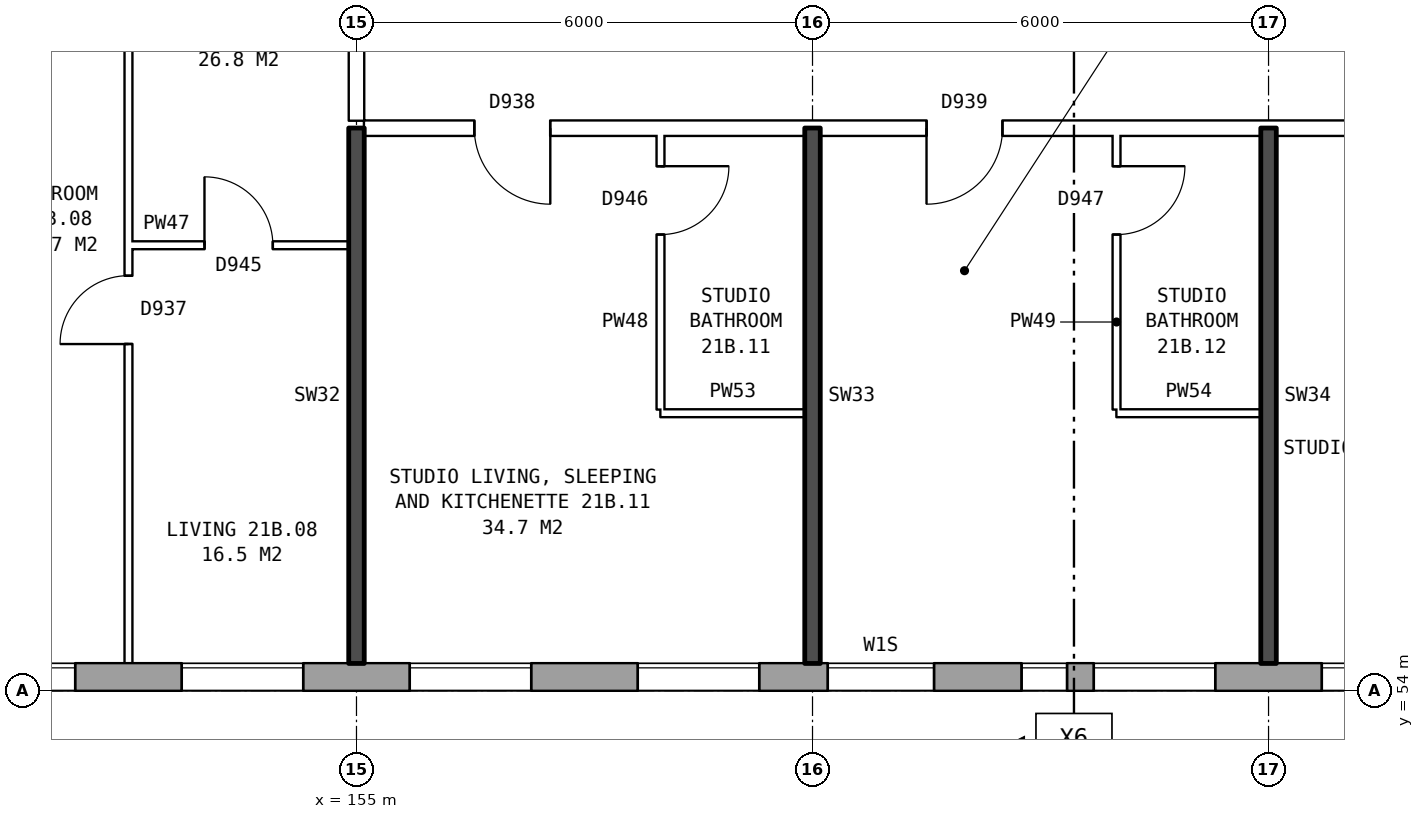
"""IFC4 building model, lengths in metres.
Left out: names, types, materials, properties, quantities, classifications, styles, units other than length and angle.
Written with IfcOpenShell. Run it as: python <this file> out.ifc"""

import sys

from ifc_helpers import new_model, si_unit, direction, frame, frame_2d, origin, place, context, subcontext, project, spatial, rectangle, extrude, element, fill, save


model = new_model("IFC4")
c1 = context("Model", 3, precision=1e-05, world=origin(), true_north=direction((0.0, 1.0)))
c2 = subcontext(c1, "Body", "Model", "MODEL_VIEW")
j1 = project(units=[si_unit("LENGTHUNIT", "METRE"), si_unit("PLANEANGLEUNIT", "RADIAN")], contexts=[c1])
p1 = place(None, origin())
s1 = spatial("IfcSite", under=j1, at=p1, CompositionType="ELEMENT")
p2 = place(p1, origin())
s2 = spatial("IfcBuilding", under=s1, at=p2, CompositionType="ELEMENT")
p3 = place(p2, frame((0.0, 0.0, 77.8)))
s3 = spatial("IfcBuildingStorey", under=s2, at=p3, CompositionType="ELEMENT", Elevation=77.8)
p4 = place(p3, frame((134.075, 54.18, 0.0), z_axis=(0.0, 0.0, 1.0), x_axis=(1.0, 0.0, 0.0)))
e1 = element("IfcWall", 1, at=p4, inside=s3, PredefinedType="STANDARD", context=c2, shape_type="SweptSolid", body=[
    extrude(rectangle(XDim=38.101, YDim=0.36, at=frame_2d((19.05, 0.0))), origin(), (0.0, 0.0, 1.0), 2.85),
])
p5 = place(p4, frame((0.625, 0.0, 0.8)))
e2 = element("IfcOpeningElement", 2, at=p5, cuts=e1, PredefinedType="OPENING", context=c2, shape_type="SweptSolid", body=[
    extrude(rectangle(XDim=1.6, YDim=1.8, at=frame_2d((0.8, 0.9))), frame((0.0, 0.19, 0.0), z_axis=(0.0, -1.0, 0.0), x_axis=(1.0, 0.0, 0.0)), (0.0, 0.0, 1.0), 0.38),
])
p6 = place(p4, frame((3.625, 0.0, 0.8)))
e3 = element("IfcOpeningElement", 3, at=p6, cuts=e1, PredefinedType="OPENING", context=c2, shape_type="SweptSolid", body=[
    extrude(rectangle(XDim=1.6, YDim=1.8, at=frame_2d((0.8, 0.9))), frame((0.0, 0.19, 0.0), z_axis=(0.0, -1.0, 0.0), x_axis=(1.0, 0.0, 0.0)), (0.0, 0.0, 1.0), 0.38),
])
p7 = place(p4, frame((5.525, 0.0, 0.8)))
e4 = element("IfcOpeningElement", 4, at=p7, cuts=e1, PredefinedType="OPENING", context=c2, shape_type="SweptSolid", body=[
    extrude(rectangle(XDim=1.6, YDim=1.8, at=frame_2d((0.8, 0.9))), frame((0.0, 0.19, 0.0), z_axis=(0.0, -1.0, 0.0), x_axis=(1.0, 0.0, 0.0)), (0.0, 0.0, 1.0), 0.38),
])
p8 = place(p4, frame((9.425, 0.0, 0.65)))
e5 = element("IfcOpeningElement", 5, at=p8, cuts=e1, PredefinedType="OPENING", context=c2, shape_type="SweptSolid", body=[
    extrude(rectangle(XDim=0.6, YDim=0.9, at=frame_2d((0.3, 0.45))), frame((0.0, 0.19, 0.0), z_axis=(0.0, -1.0, 0.0), x_axis=(1.0, 0.0, 0.0)), (0.0, 0.0, 1.0), 0.38),
])
p9 = place(p4, frame((12.625, 0.0, 0.8)))
e6 = element("IfcOpeningElement", 6, at=p9, cuts=e1, PredefinedType="OPENING", context=c2, shape_type="SweptSolid", body=[
    extrude(rectangle(XDim=1.6, YDim=1.8, at=frame_2d((0.8, 0.9))), frame((0.0, 0.19, 0.0), z_axis=(0.0, -1.0, 0.0), x_axis=(1.0, 0.0, 0.0)), (0.0, 0.0, 1.0), 0.38),
])
p10 = place(p4, frame((15.625, 0.0, 0.8)))
e7 = element("IfcOpeningElement", 7, at=p10, cuts=e1, PredefinedType="OPENING", context=c2, shape_type="SweptSolid", body=[
    extrude(rectangle(XDim=1.6, YDim=1.8, at=frame_2d((0.8, 0.9))), frame((0.0, 0.19, 0.0), z_axis=(0.0, -1.0, 0.0), x_axis=(1.0, 0.0, 0.0)), (0.0, 0.0, 1.0), 0.38),
])
p11 = place(p4, frame((18.625, 0.0, 0.8)))
e8 = element("IfcOpeningElement", 8, at=p11, cuts=e1, PredefinedType="OPENING", context=c2, shape_type="SweptSolid", body=[
    extrude(rectangle(XDim=1.6, YDim=1.8, at=frame_2d((0.8, 0.9))), frame((0.0, 0.19, 0.0), z_axis=(0.0, -1.0, 0.0), x_axis=(1.0, 0.0, 0.0)), (0.0, 0.0, 1.0), 0.38),
])
p12 = place(p4, frame((21.625, 0.0, 0.8)))
e9 = element("IfcOpeningElement", 9, at=p12, cuts=e1, PredefinedType="OPENING", context=c2, shape_type="SweptSolid", body=[
    extrude(rectangle(XDim=1.6, YDim=1.8, at=frame_2d((0.8, 0.9))), frame((0.0, 0.19, 0.0), z_axis=(0.0, -1.0, 0.0), x_axis=(1.0, 0.0, 0.0)), (0.0, 0.0, 1.0), 0.38),
])
p13 = place(p4, frame((24.625, 0.0, 0.8)))
e10 = element("IfcOpeningElement", 10, at=p13, cuts=e1, PredefinedType="OPENING", context=c2, shape_type="SweptSolid", body=[
    extrude(rectangle(XDim=1.6, YDim=1.8, at=frame_2d((0.8, 0.9))), frame((0.0, 0.19, 0.0), z_axis=(0.0, -1.0, 0.0), x_axis=(1.0, 0.0, 0.0)), (0.0, 0.0, 1.0), 0.38),
])
p14 = place(p4, frame((27.125, 0.0, 0.8)))
e11 = element("IfcOpeningElement", 11, at=p14, cuts=e1, PredefinedType="OPENING", context=c2, shape_type="SweptSolid", body=[
    extrude(rectangle(XDim=1.4, YDim=0.9, at=frame_2d((0.7, 0.45))), frame((0.0, 0.19, 0.0), z_axis=(0.0, -1.0, 0.0), x_axis=(1.0, 0.0, 0.0)), (0.0, 0.0, 1.0), 0.38),
])
p15 = place(p4, frame((30.625, 0.0, 0.8)))
e12 = element("IfcOpeningElement", 12, at=p15, cuts=e1, PredefinedType="OPENING", context=c2, shape_type="SweptSolid", body=[
    extrude(rectangle(XDim=1.6, YDim=1.8, at=frame_2d((0.8, 0.9))), frame((0.0, 0.19, 0.0), z_axis=(0.0, -1.0, 0.0), x_axis=(1.0, 0.0, 0.0)), (0.0, 0.0, 1.0), 0.38),
])
p16 = place(p4, frame((33.625, 0.0, 0.8)))
e13 = element("IfcOpeningElement", 13, at=p16, cuts=e1, PredefinedType="OPENING", context=c2, shape_type="SweptSolid", body=[
    extrude(rectangle(XDim=1.6, YDim=1.8, at=frame_2d((0.8, 0.9))), frame((0.0, 0.19, 0.0), z_axis=(0.0, -1.0, 0.0), x_axis=(1.0, 0.0, 0.0)), (0.0, 0.0, 1.0), 0.38),
])
p17 = place(p4, frame((7.425, 0.0, 1.3)))
e14 = element("IfcOpeningElement", 14, at=p17, cuts=e1, PredefinedType="OPENING", context=c2, shape_type="SweptSolid", body=[
    extrude(rectangle(XDim=0.6, YDim=1.2, at=frame_2d((0.3, 0.6))), frame((0.0, 0.19, 0.0), z_axis=(0.0, -1.0, 0.0), x_axis=(1.0, 0.0, 0.0)), (0.0, 0.0, 1.0), 0.38),
])
p18 = place(p4, frame((10.325, 0.0, 0.65)))
e15 = element("IfcOpeningElement", 15, at=p18, cuts=e1, PredefinedType="OPENING", context=c2, shape_type="SweptSolid", body=[
    extrude(rectangle(XDim=1.4, YDim=1.8, at=frame_2d((0.7, 0.9))), frame((0.0, 0.19, 0.0), z_axis=(0.0, -1.0, 0.0), x_axis=(1.0, 0.0, 0.0)), (0.0, 0.0, 1.0), 0.38),
])
p19 = place(p4, frame((29.675, 0.0, 1.7)))
e16 = element("IfcOpeningElement", 16, at=p19, cuts=e1, PredefinedType="OPENING", context=c2, shape_type="SweptSolid", body=[
    extrude(rectangle(XDim=0.6, YDim=0.9, at=frame_2d((0.3, 0.45))), frame((0.0, 0.19, 0.0), z_axis=(0.0, -1.0, 0.0), x_axis=(1.0, 0.0, 0.0)), (0.0, 0.0, 1.0), 0.38),
])
for number, where, z_axis, x_axis in (
    (17, (159.0, 57.65, 0.0), (0.0, 0.0, 1.0), (1.0, 0.0, 0.0)),
    (18, (165.0, 57.65, 0.0), (0.0, 0.0, 1.0), (1.0, 0.0, 0.0)),
):
    element("IfcWall", number, at=place(p3, frame(where, z_axis=z_axis, x_axis=x_axis)), inside=s3, PredefinedType="PARTITIONING", context=c2, shape_type="SweptSolid", body=[
        extrude(rectangle(XDim=1.9, YDim=0.1, at=frame_2d((0.95, 0.0))), origin(), (0.0, 0.0, 1.0), 2.85),
    ])
p20 = place(p3, frame((152.0, 59.86, 0.0), z_axis=(0.0, 0.0, 1.0), x_axis=(1.0, 0.0, 0.0)))
e19 = element("IfcWall", 19, at=p20, inside=s3, PredefinedType="PARTITIONING", context=c2, shape_type="SweptSolid", body=[
    extrude(rectangle(XDim=2.9, YDim=0.1, at=frame_2d((1.45, 0.0))), origin(), (0.0, 0.0, 1.0), 2.85),
])
p21 = place(p20, frame((1.0, 0.0, 0.0)))
e20 = element("IfcOpeningElement", 20, at=p21, cuts=e19, PredefinedType="OPENING", context=c2, shape_type="SweptSolid", body=[
    extrude(rectangle(XDim=0.9, YDim=2.1, at=frame_2d((0.45, 1.05))), frame((0.0, 0.06, 0.0), z_axis=(0.0, -1.0, 0.0), x_axis=(1.0, 0.0, 0.0)), (0.0, 0.0, 1.0), 0.12),
])
p22 = place(p3, frame((155.1, 61.4, 0.0), z_axis=(0.0, 0.0, 1.0), x_axis=(1.0, 0.0, 0.0)))
e21 = element("IfcWall", 21, at=p22, inside=s3, PredefinedType="PARTITIONING", context=c2, shape_type="SweptSolid", body=[
    extrude(rectangle(XDim=19.79, YDim=0.2, at=frame_2d((9.895, 0.0))), origin(), (0.0, 0.0, 1.0), 2.85),
])
p23 = place(p22, frame((1.45, 0.0, 0.0)))
e22 = element("IfcOpeningElement", 22, at=p23, cuts=e21, PredefinedType="OPENING", context=c2, shape_type="SweptSolid", body=[
    extrude(rectangle(XDim=1.0, YDim=2.1, at=frame_2d((0.5, 1.05))), frame((0.0, 0.11, 0.0), z_axis=(0.0, -1.0, 0.0), x_axis=(1.0, 0.0, 0.0)), (0.0, 0.0, 1.0), 0.22),
])
p24 = place(p22, frame((7.4, 0.0, 0.0)))
e23 = element("IfcOpeningElement", 23, at=p24, cuts=e21, PredefinedType="OPENING", context=c2, shape_type="SweptSolid", body=[
    extrude(rectangle(XDim=1.0, YDim=2.1, at=frame_2d((0.5, 1.05))), frame((0.0, 0.11, 0.0), z_axis=(0.0, -1.0, 0.0), x_axis=(1.0, 0.0, 0.0)), (0.0, 0.0, 1.0), 0.22),
])
p25 = place(p22, frame((13.2, 0.0, 0.0)))
e24 = element("IfcOpeningElement", 24, at=p25, cuts=e21, PredefinedType="OPENING", context=c2, shape_type="SweptSolid", body=[
    extrude(rectangle(XDim=1.0, YDim=2.1, at=frame_2d((0.5, 1.05))), frame((0.0, 0.11, 0.0), z_axis=(0.0, -1.0, 0.0), x_axis=(1.0, 0.0, 0.0)), (0.0, 0.0, 1.0), 0.22),
])
p26 = place(p3, frame((152.0, 54.36, 0.0), z_axis=(0.0, 0.0, 1.0), x_axis=(0.0, 1.0, 0.0)))
e25 = element("IfcWall", 25, at=p26, inside=s3, PredefinedType="PARTITIONING", context=c2, shape_type="SweptSolid", body=[
    extrude(rectangle(XDim=14.34, YDim=0.1, at=frame_2d((7.17, 0.0))), origin(), (0.0, 0.0, 1.0), 2.85),
])
p27 = place(p26, frame((4.2, 0.0, 0.0)))
e26 = element("IfcOpeningElement", 26, at=p27, cuts=e25, PredefinedType="OPENING", context=c2, shape_type="SweptSolid", body=[
    extrude(rectangle(XDim=0.9, YDim=2.1, at=frame_2d((0.45, 1.05))), frame((0.0, 0.06, 0.0), z_axis=(0.0, -1.0, 0.0), x_axis=(1.0, 0.0, 0.0)), (0.0, 0.0, 1.0), 0.12),
])
p28 = place(p26, frame((13.04, 0.0, 0.0)))
e27 = element("IfcOpeningElement", 27, at=p28, cuts=e25, PredefinedType="OPENING", context=c2, shape_type="SweptSolid", body=[
    extrude(rectangle(XDim=0.9, YDim=2.1, at=frame_2d((0.45, 1.05))), frame((0.0, 0.06, 0.0), z_axis=(0.0, -1.0, 0.0), x_axis=(1.0, 0.0, 0.0)), (0.0, 0.0, 1.0), 0.12),
])
p29 = place(p3, frame((155.0, 54.36, 0.0), z_axis=(0.0, 0.0, 1.0), x_axis=(0.0, 1.0, 0.0)))
e28 = element("IfcWall", 28, at=p29, inside=s3, PredefinedType="SOLIDWALL", context=c2, shape_type="SweptSolid", body=[
    extrude(rectangle(XDim=7.04, YDim=0.2, at=frame_2d((3.52, 0.0))), origin(), (0.0, 0.0, 1.0), 2.85),
])
p30 = place(p3, frame((155.0, 61.5, 0.0), z_axis=(0.0, 0.0, 1.0), x_axis=(0.0, 1.0, 0.0)))
e29 = element("IfcWall", 29, at=p30, inside=s3, PredefinedType="PARTITIONING", context=c2, shape_type="SweptSolid", body=[
    extrude(rectangle(XDim=2.2, YDim=0.2, at=frame_2d((1.1, 0.0))), origin(), (0.0, 0.0, 1.0), 2.85),
])
p31 = place(p3, frame((159.0, 57.7, 0.0), z_axis=(0.0, 0.0, 1.0), x_axis=(0.0, 1.0, 0.0)))
e30 = element("IfcWall", 30, at=p31, inside=s3, PredefinedType="PARTITIONING", context=c2, shape_type="SweptSolid", body=[
    extrude(rectangle(XDim=3.6, YDim=0.1, at=frame_2d((1.8, 0.0))), origin(), (0.0, 0.0, 1.0), 2.85),
])
p32 = place(p31, frame((2.3, 0.0, 0.0)))
e31 = element("IfcOpeningElement", 31, at=p32, cuts=e30, PredefinedType="OPENING", context=c2, shape_type="SweptSolid", body=[
    extrude(rectangle(XDim=0.9, YDim=2.1, at=frame_2d((0.45, 1.05))), frame((0.0, 0.06, 0.0), z_axis=(0.0, -1.0, 0.0), x_axis=(1.0, 0.0, 0.0)), (0.0, 0.0, 1.0), 0.12),
])
p33 = place(p3, frame((161.0, 54.36, 0.0), z_axis=(0.0, 0.0, 1.0), x_axis=(0.0, 1.0, 0.0)))
e32 = element("IfcWall", 32, at=p33, inside=s3, PredefinedType="SOLIDWALL", context=c2, shape_type="SweptSolid", body=[
    extrude(rectangle(XDim=7.04, YDim=0.2, at=frame_2d((3.52, 0.0))), origin(), (0.0, 0.0, 1.0), 2.85),
])
p34 = place(p3, frame((165.0, 57.7, 0.0), z_axis=(0.0, 0.0, 1.0), x_axis=(0.0, 1.0, 0.0)))
e33 = element("IfcWall", 33, at=p34, inside=s3, PredefinedType="PARTITIONING", context=c2, shape_type="SweptSolid", body=[
    extrude(rectangle(XDim=3.6, YDim=0.1, at=frame_2d((1.8, 0.0))), origin(), (0.0, 0.0, 1.0), 2.85),
])
p35 = place(p34, frame((2.3, 0.0, 0.0)))
e34 = element("IfcOpeningElement", 34, at=p35, cuts=e33, PredefinedType="OPENING", context=c2, shape_type="SweptSolid", body=[
    extrude(rectangle(XDim=0.9, YDim=2.1, at=frame_2d((0.45, 1.05))), frame((0.0, 0.06, 0.0), z_axis=(0.0, -1.0, 0.0), x_axis=(1.0, 0.0, 0.0)), (0.0, 0.0, 1.0), 0.12),
])
p36 = place(p3, frame((167.0, 54.36, 0.0), z_axis=(0.0, 0.0, 1.0), x_axis=(0.0, 1.0, 0.0)))
e35 = element("IfcWall", 35, at=p36, inside=s3, PredefinedType="SOLIDWALL", context=c2, shape_type="SweptSolid", body=[
    extrude(rectangle(XDim=7.04, YDim=0.2, at=frame_2d((3.52, 0.0))), origin(), (0.0, 0.0, 1.0), 2.85),
])
p37 = place(p10, origin())
e36 = element("IfcWindow", 36, at=p37, inside=s3, PartitioningType="SINGLE_PANEL", PredefinedType="WINDOW", context=c2, shape_type="SweptSolid", body=[
    extrude(rectangle(XDim=1.6, YDim=1.8, at=frame_2d((0.8, 0.9))), frame((0.0, 0.15, 0.0), z_axis=(0.0, -1.0, 0.0), x_axis=(1.0, 0.0, 0.0)), (0.0, 0.0, 1.0), 0.06),
])
fill(e7, e36)
p38 = place(p11, origin())
e37 = element("IfcWindow", 37, at=p38, inside=s3, PartitioningType="SINGLE_PANEL", PredefinedType="WINDOW", context=c2, shape_type="SweptSolid", body=[
    extrude(rectangle(XDim=1.6, YDim=1.8, at=frame_2d((0.8, 0.9))), frame((0.0, 0.15, 0.0), z_axis=(0.0, -1.0, 0.0), x_axis=(1.0, 0.0, 0.0)), (0.0, 0.0, 1.0), 0.06),
])
fill(e8, e37)
p39 = place(p12, origin())
e38 = element("IfcWindow", 38, at=p39, inside=s3, PartitioningType="SINGLE_PANEL", PredefinedType="WINDOW", context=c2, shape_type="SweptSolid", body=[
    extrude(rectangle(XDim=1.6, YDim=1.8, at=frame_2d((0.8, 0.9))), frame((0.0, 0.15, 0.0), z_axis=(0.0, -1.0, 0.0), x_axis=(1.0, 0.0, 0.0)), (0.0, 0.0, 1.0), 0.06),
])
fill(e9, e38)
p40 = place(p13, origin())
e39 = element("IfcWindow", 39, at=p40, inside=s3, PartitioningType="SINGLE_PANEL", PredefinedType="WINDOW", context=c2, shape_type="SweptSolid", body=[
    extrude(rectangle(XDim=1.6, YDim=1.8, at=frame_2d((0.8, 0.9))), frame((0.0, 0.15, 0.0), z_axis=(0.0, -1.0, 0.0), x_axis=(1.0, 0.0, 0.0)), (0.0, 0.0, 1.0), 0.06),
])
fill(e10, e39)
p41 = place(p14, origin())
e40 = element("IfcWindow", 40, at=p41, inside=s3, PartitioningType="SINGLE_PANEL", PredefinedType="WINDOW", context=c2, shape_type="SweptSolid", body=[
    extrude(rectangle(XDim=1.4, YDim=0.9, at=frame_2d((0.7, 0.45))), frame((0.0, 0.15, 0.0), z_axis=(0.0, -1.0, 0.0), x_axis=(1.0, 0.0, 0.0)), (0.0, 0.0, 1.0), 0.06),
])
fill(e11, e40)
p42 = place(p15, origin())
e41 = element("IfcWindow", 41, at=p42, inside=s3, PartitioningType="SINGLE_PANEL", PredefinedType="WINDOW", context=c2, shape_type="SweptSolid", body=[
    extrude(rectangle(XDim=1.6, YDim=1.8, at=frame_2d((0.8, 0.9))), frame((0.0, 0.15, 0.0), z_axis=(0.0, -1.0, 0.0), x_axis=(1.0, 0.0, 0.0)), (0.0, 0.0, 1.0), 0.06),
])
fill(e12, e41)
p43 = place(p16, origin())
e42 = element("IfcWindow", 42, at=p43, inside=s3, PartitioningType="SINGLE_PANEL", PredefinedType="WINDOW", context=c2, shape_type="SweptSolid", body=[
    extrude(rectangle(XDim=1.6, YDim=1.8, at=frame_2d((0.8, 0.9))), frame((0.0, 0.15, 0.0), z_axis=(0.0, -1.0, 0.0), x_axis=(1.0, 0.0, 0.0)), (0.0, 0.0, 1.0), 0.06),
])
fill(e13, e42)
p44 = place(p27, origin())
e43 = element("IfcDoor", 43, at=p44, inside=s3, OperationType="SINGLE_SWING_LEFT", PredefinedType="DOOR", context=c2, shape_type="SweptSolid", body=[
    extrude(rectangle(XDim=0.9, YDim=2.1, at=frame_2d((0.45, 1.05))), frame((0.0, 0.025, 0.0), z_axis=(0.0, -1.0, 0.0), x_axis=(1.0, 0.0, 0.0)), (0.0, 0.0, 1.0), 0.05),
])
fill(e26, e43)
p45 = place(p21, origin())
e44 = element("IfcDoor", 44, at=p45, inside=s3, OperationType="SINGLE_SWING_LEFT", PredefinedType="DOOR", context=c2, shape_type="SweptSolid", body=[
    extrude(rectangle(XDim=0.9, YDim=2.1, at=frame_2d((0.45, 1.05))), frame((0.0, 0.025, 0.0), z_axis=(0.0, -1.0, 0.0), x_axis=(1.0, 0.0, 0.0)), (0.0, 0.0, 1.0), 0.05),
])
fill(e20, e44)
p46 = place(p23, frame((1.0, 0.0, 0.0), z_axis=(0.0, 0.0, 1.0), x_axis=(-1.0, 0.0, 0.0)))
e45 = element("IfcDoor", 45, at=p46, inside=s3, OperationType="SINGLE_SWING_LEFT", PredefinedType="DOOR", context=c2, shape_type="SweptSolid", body=[
    extrude(rectangle(XDim=1.0, YDim=2.1, at=frame_2d((0.5, 1.05))), frame((0.0, 0.025, 0.0), z_axis=(0.0, -1.0, 0.0), x_axis=(1.0, 0.0, 0.0)), (0.0, 0.0, 1.0), 0.05),
])
fill(e22, e45)
p47 = place(p32, frame((0.9, 0.0, 0.0), z_axis=(0.0, 0.0, 1.0), x_axis=(-1.0, 0.0, 0.0)))
e46 = element("IfcDoor", 46, at=p47, inside=s3, OperationType="SINGLE_SWING_LEFT", PredefinedType="DOOR", context=c2, shape_type="SweptSolid", body=[
    extrude(rectangle(XDim=0.9, YDim=2.1, at=frame_2d((0.45, 1.05))), frame((0.0, 0.025, 0.0), z_axis=(0.0, -1.0, 0.0), x_axis=(1.0, 0.0, 0.0)), (0.0, 0.0, 1.0), 0.05),
])
fill(e31, e46)
p48 = place(p24, frame((1.0, 0.0, 0.0), z_axis=(0.0, 0.0, 1.0), x_axis=(-1.0, 0.0, 0.0)))
e47 = element("IfcDoor", 47, at=p48, inside=s3, OperationType="SINGLE_SWING_RIGHT", PredefinedType="DOOR", context=c2, shape_type="SweptSolid", body=[
    extrude(rectangle(XDim=1.0, YDim=2.1, at=frame_2d((0.5, 1.05))), frame((0.0, 0.025, 0.0), z_axis=(0.0, -1.0, 0.0), x_axis=(1.0, 0.0, 0.0)), (0.0, 0.0, 1.0), 0.05),
])
fill(e23, e47)
p49 = place(p35, frame((0.9, 0.0, 0.0), z_axis=(0.0, 0.0, 1.0), x_axis=(-1.0, 0.0, 0.0)))
e48 = element("IfcDoor", 48, at=p49, inside=s3, OperationType="SINGLE_SWING_LEFT", PredefinedType="DOOR", context=c2, shape_type="SweptSolid", body=[
    extrude(rectangle(XDim=0.9, YDim=2.1, at=frame_2d((0.45, 1.05))), frame((0.0, 0.025, 0.0), z_axis=(0.0, -1.0, 0.0), x_axis=(1.0, 0.0, 0.0)), (0.0, 0.0, 1.0), 0.05),
])
fill(e34, e48)
p50 = place(p19, origin())
e49 = element("IfcWindow", 49, at=p50, inside=s3, PartitioningType="SINGLE_PANEL", PredefinedType="WINDOW", context=c2, shape_type="SweptSolid", body=[
    extrude(rectangle(XDim=0.6, YDim=0.9, at=frame_2d((0.3, 0.45))), frame((0.0, 0.15, 0.0), z_axis=(0.0, -1.0, 0.0), x_axis=(1.0, 0.0, 0.0)), (0.0, 0.0, 1.0), 0.06),
])
fill(e16, e49)
save(model, sys.argv[1])
